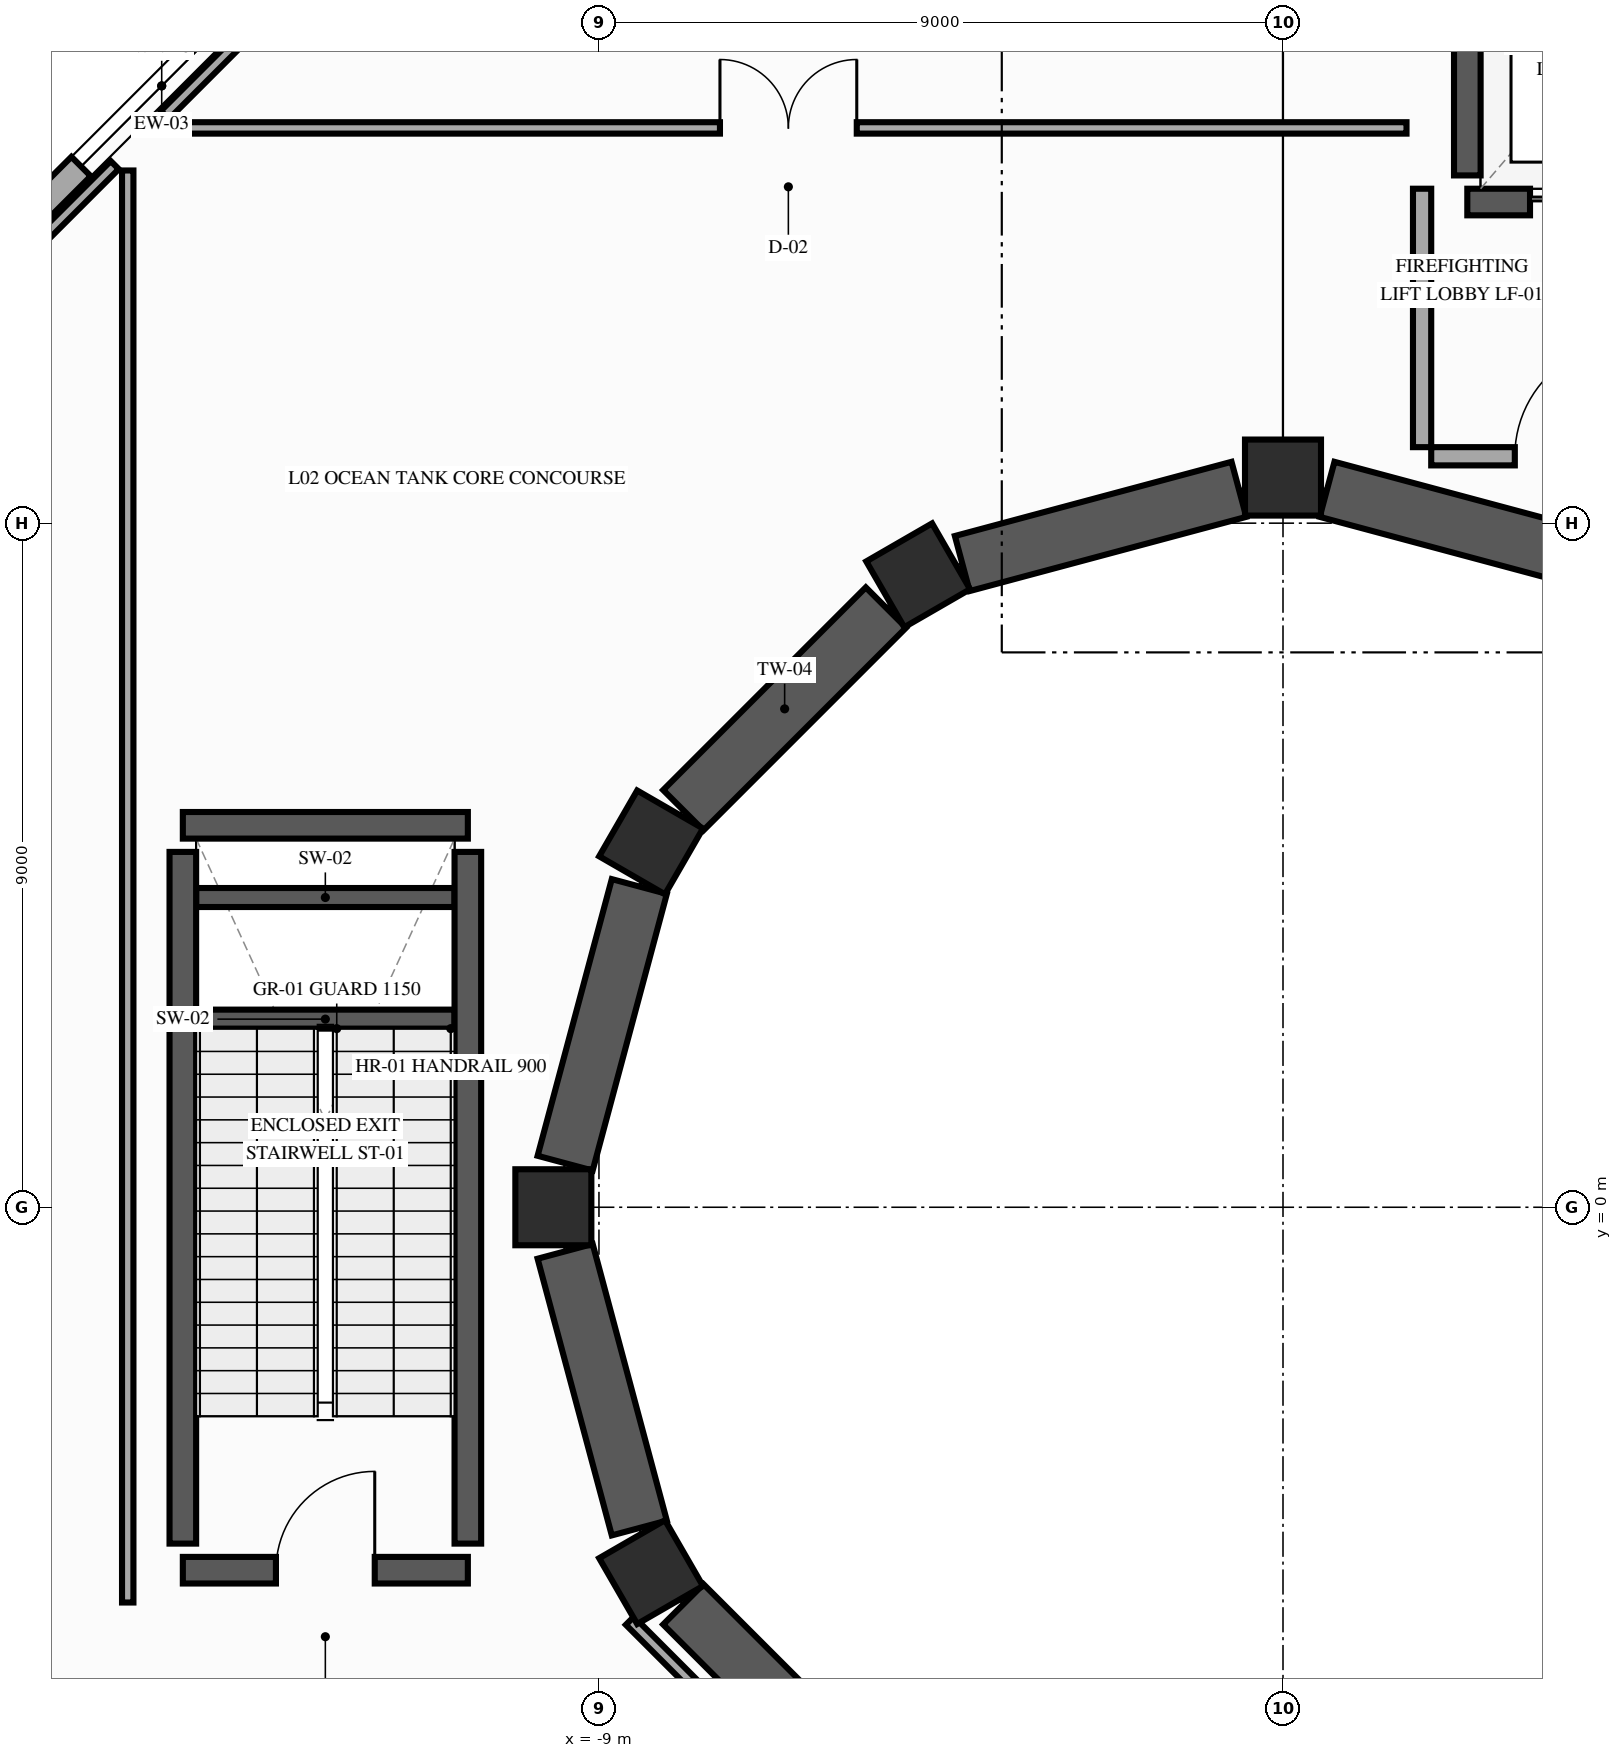
"""IFC4 building model, lengths in metres.
Left out: names, types, materials, properties, quantities, classifications, styles, units other than length and angle.
Written with IfcOpenShell. Run it as: python <this file> out.ifc"""

import sys

from ifc_helpers import new_model, si_unit, direction, frame, frame_2d, origin, origin_2d, place, context, subcontext, project, spatial, rectangle, extrude, element, fill, save


model = new_model("IFC4")
c1 = context("Model", 3, precision=1e-05, world=origin(), true_north=direction((0.0, 1.0)))
c2 = subcontext(c1, "Body", "Model", "MODEL_VIEW")
j1 = project(units=[si_unit("LENGTHUNIT", "METRE"), si_unit("PLANEANGLEUNIT", "RADIAN")], contexts=[c1])
p1 = place(None, origin())
s1 = spatial("IfcSite", under=j1, at=p1, CompositionType="ELEMENT")
p2 = place(p1, origin())
s2 = spatial("IfcBuilding", under=s1, at=p2, CompositionType="ELEMENT")
p3 = place(p2, frame((0.0, 0.0, 10.8)))
s3 = spatial("IfcBuildingStorey", under=s2, at=p3, CompositionType="ELEMENT", Elevation=10.8)
for number, where, z_axis, x_axis in (
    (1, (0.0, 9.6, 0.0), (0.0, 0.0, 1.0), (0.0, 1.0, 0.0)),
    (2, (-4.8, 8.314, 0.0), (0.0, 0.0, 1.0), (-0.5, 0.866, 0.0)),
    (3, (-8.314, 4.8, 0.0), (0.0, 0.0, 1.0), (-0.866, 0.5, 0.0)),
    (4, (-9.6, 0.0, 0.0), (0.0, 0.0, 1.0), (-1.0, 0.0, 0.0)),
    (5, (-8.314, -4.8, 0.0), (0.0, 0.0, 1.0), (-0.866, -0.5, 0.0)),
):
    element("IfcColumn", number, at=place(p3, frame(where, z_axis=z_axis, x_axis=x_axis)), inside=s3, PredefinedType="COLUMN", context=c2, shape_type="SweptSolid", body=[
        extrude(rectangle(XDim=1.0, YDim=1.0, at=origin_2d()), origin(), (0.0, 0.0, 1.0), 5.4),
    ])
for number, where, z_axis, x_axis in (
    (6, (4.22, 8.469, 0.0), (0.0, 0.0, 1.0), (-0.966, 0.259, 0.0)),
    (7, (-0.58, 9.445, 0.0), (0.0, 0.0, 1.0), (-0.966, -0.259, 0.0)),
):
    element("IfcWall", number, at=place(p3, frame(where, z_axis=z_axis, x_axis=x_axis)), inside=s3, PredefinedType="SHEAR", context=c2, shape_type="SweptSolid", body=[
        extrude(rectangle(XDim=3.769, YDim=0.75, at=frame_2d((1.884, 0.0))), origin(), (0.0, 0.0, 1.0), 5.16),
    ])
p4 = place(p3, frame((-5.224, 7.89, 0.0), z_axis=(0.0, 0.0, 1.0), x_axis=(-0.707106781187, -0.707106781187, 0.0)))
e8 = element("IfcWall", 8, at=p4, inside=s3, PredefinedType="SHEAR", context=c2, shape_type="SweptSolid", body=[
    extrude(rectangle(XDim=3.77, YDim=0.75, at=frame_2d((1.885, 0.0))), origin(), (0.0, 0.0, 1.0), 5.16),
])
for number, where, z_axis, x_axis in (
    (9, (-8.469, 4.22, 0.0), (0.0, 0.0, 1.0), (-0.259, -0.966, 0.0)),
    (10, (-9.445, -0.58, 0.0), (0.0, 0.0, 1.0), (0.259, -0.966, 0.0)),
):
    element("IfcWall", number, at=place(p3, frame(where, z_axis=z_axis, x_axis=x_axis)), inside=s3, PredefinedType="SHEAR", context=c2, shape_type="SweptSolid", body=[
        extrude(rectangle(XDim=3.769, YDim=0.75, at=frame_2d((1.884, 0.0))), origin(), (0.0, 0.0, 1.0), 5.16),
    ])
p5 = place(p3, frame((-7.89, -5.224, 0.0), z_axis=(0.0, 0.0, 1.0), x_axis=(0.707106781187, -0.707106781187, 0.0)))
e11 = element("IfcWall", 11, at=p5, inside=s3, PredefinedType="SHEAR", context=c2, shape_type="SweptSolid", body=[
    extrude(rectangle(XDim=3.77, YDim=0.75, at=frame_2d((1.885, 0.0))), origin(), (0.0, 0.0, 1.0), 5.16),
])
p6 = place(p3, frame((-18.215, 11.291, 0.0), z_axis=(0.0, 0.0, 1.0), x_axis=(0.707106781187, 0.707106781187, 0.0)))
e12 = element("IfcWall", 12, at=p6, inside=s3, PredefinedType="SOLIDWALL", context=c2, shape_type="SweptSolid", body=[
    extrude(rectangle(XDim=9.792, YDim=0.36, at=frame_2d((4.896, 0.0))), origin(), (0.0, 0.0, 1.0), 4.395),
])
p7 = place(p6, frame((3.396, 0.0, 0.9)))
e13 = element("IfcOpeningElement", 13, at=p7, cuts=e12, PredefinedType="OPENING", context=c2, shape_type="SweptSolid", body=[
    extrude(rectangle(XDim=3.0, YDim=2.0, at=frame_2d((1.5, 1.0))), frame((0.0, 0.19, 0.0), z_axis=(0.0, -1.0, 0.0), x_axis=(1.0, 0.0, 0.0)), (0.0, 0.0, 1.0), 0.38),
])
for number, where, z_axis, x_axis in (
    (14, (-14.3, 2.475, 0.0), (0.0, 0.0, 1.0), (1.0, 0.0, 0.0)),
    (15, (-14.3, 4.075, 0.0), (0.0, 0.0, 1.0), (1.0, 0.0, 0.0)),
):
    element("IfcWall", number, at=place(p3, frame(where, z_axis=z_axis, x_axis=x_axis)), inside=s3, PredefinedType="SHEAR", context=c2, shape_type="SweptSolid", body=[
        extrude(rectangle(XDim=3.4, YDim=0.25, at=frame_2d((1.7, 0.0))), origin(), (0.0, 0.0, 1.0), 2.5),
    ])
p8 = place(p3, frame((-14.475, -4.775, 0.0), z_axis=(0.0, 0.0, 1.0), x_axis=(1.0, 0.0, 0.0)))
e16 = element("IfcWall", 16, at=p8, inside=s3, PredefinedType="SHEAR", context=c2, shape_type="SweptSolid", body=[
    extrude(rectangle(XDim=3.75, YDim=0.35, at=frame_2d((1.875, 0.0))), origin(), (0.0, 0.0, 1.0), 5.16),
])
p9 = place(p8, frame((1.225, 0.0, 0.0)))
e17 = element("IfcOpeningElement", 17, at=p9, cuts=e16, PredefinedType="OPENING", context=c2, shape_type="SweptSolid", body=[
    extrude(rectangle(XDim=1.3, YDim=2.2, at=frame_2d((0.65, 1.1))), frame((0.0, 0.185, 0.0), z_axis=(0.0, -1.0, 0.0), x_axis=(1.0, 0.0, 0.0)), (0.0, 0.0, 1.0), 0.37),
])
p10 = place(p3, frame((-14.475, 5.025, 0.0), z_axis=(0.0, 0.0, 1.0), x_axis=(1.0, 0.0, 0.0)))
e18 = element("IfcWall", 18, at=p10, inside=s3, PredefinedType="SHEAR", context=c2, shape_type="SweptSolid", body=[
    extrude(rectangle(XDim=3.75, YDim=0.35, at=frame_2d((1.875, 0.0))), origin(), (0.0, 0.0, 1.0), 5.16),
])
for number, where, z_axis, x_axis in (
    (19, (-14.475, -4.425, 0.0), (0.0, 0.0, 1.0), (0.0, 1.0, 0.0)),
    (20, (-10.725, -4.425, 0.0), (0.0, 0.0, 1.0), (0.0, 1.0, 0.0)),
):
    element("IfcWall", number, at=place(p3, frame(where, z_axis=z_axis, x_axis=x_axis)), inside=s3, PredefinedType="SHEAR", context=c2, shape_type="SweptSolid", body=[
        extrude(rectangle(XDim=9.1, YDim=0.35, at=frame_2d((4.55, 0.0))), origin(), (0.0, 0.0, 1.0), 5.16),
    ])
p11 = place(p3, frame((2.425, 13.225, 0.0), z_axis=(0.0, 0.0, 1.0), x_axis=(1.0, 0.0, 0.0)))
e21 = element("IfcWall", 21, at=p11, inside=s3, PredefinedType="SHEAR", context=c2, shape_type="SweptSolid", body=[
    extrude(rectangle(XDim=2.75, YDim=0.35, at=frame_2d((1.375, 0.0))), origin(), (0.0, 0.0, 1.0), 5.16),
])
p12 = place(p11, frame((0.825, 0.0, 0.0)))
e22 = element("IfcOpeningElement", 22, at=p12, cuts=e21, PredefinedType="OPENING", context=c2, shape_type="SweptSolid", body=[
    extrude(rectangle(XDim=1.1, YDim=2.2, at=frame_2d((0.55, 1.1))), frame((0.0, 0.185, 0.0), z_axis=(0.0, -1.0, 0.0), x_axis=(1.0, 0.0, 0.0)), (0.0, 0.0, 1.0), 0.37),
])
p13 = place(p3, frame((2.425, 13.575, 0.0), z_axis=(0.0, 0.0, 1.0), x_axis=(0.0, 1.0, 0.0)))
e23 = element("IfcWall", 23, at=p13, inside=s3, PredefinedType="SHEAR", context=c2, shape_type="SweptSolid", body=[
    extrude(rectangle(XDim=2.45, YDim=0.35, at=frame_2d((1.225, 0.0))), origin(), (0.0, 0.0, 1.0), 5.16),
])
p14 = place(p3, frame((1.95, 9.88, 0.0), z_axis=(0.0, 0.0, 1.0), x_axis=(1.0, 0.0, 0.0)))
e24 = element("IfcWall", 24, at=p14, inside=s3, PredefinedType="PARTITIONING", context=c2, shape_type="SweptSolid", body=[
    extrude(rectangle(XDim=3.7, YDim=0.24, at=frame_2d((1.85, 0.0))), origin(), (0.0, 0.0, 1.0), 4.545),
])
p15 = place(p14, frame((1.1, 0.0, 0.0)))
e25 = element("IfcOpeningElement", 25, at=p15, cuts=e24, PredefinedType="OPENING", context=c2, shape_type="SweptSolid", body=[
    extrude(rectangle(XDim=1.5, YDim=2.2, at=frame_2d((0.75, 1.1))), frame((0.0, 0.13, 0.0), z_axis=(0.0, -1.0, 0.0), x_axis=(1.0, 0.0, 0.0)), (0.0, 0.0, 1.0), 0.26),
])
p16 = place(p3, frame((1.83, 10.0, 0.0), z_axis=(0.0, 0.0, 1.0), x_axis=(0.0, 1.0, 0.0)))
e26 = element("IfcWall", 26, at=p16, inside=s3, PredefinedType="PARTITIONING", context=c2, shape_type="SweptSolid", body=[
    extrude(rectangle(XDim=3.4, YDim=0.24, at=frame_2d((1.7, 0.0))), origin(), (0.0, 0.0, 1.0), 5.11),
])
p17 = place(p3, frame((-5.44, -8.593, 0.0), z_axis=(0.0, 0.0, 1.0), x_axis=(-0.707106781187, 0.707106781187, 0.0)))
e27 = element("IfcWall", 27, at=p17, inside=s3, PredefinedType="PARTITIONING", context=c2, shape_type="SweptSolid", body=[
    extrude(rectangle(XDim=4.459, YDim=0.15, at=frame_2d((2.229, 0.0))), origin(), (0.0, 0.0, 1.0), 4.545),
])
p18 = place(p3, frame((-15.2, -5.2, 0.0), z_axis=(0.0, 0.0, 1.0), x_axis=(0.0, 1.0, 0.0)))
e28 = element("IfcWall", 28, at=p18, inside=s3, PredefinedType="PARTITIONING", context=c2, shape_type="SweptSolid", body=[
    extrude(rectangle(XDim=18.84, YDim=0.15, at=frame_2d((9.42, 0.0))), origin(), (0.0, 0.0, 1.0), 4.395),
])
p19 = place(p3, frame((-15.371, 13.711, 0.0), z_axis=(0.0, 0.0, 1.0), x_axis=(-0.706972707094, -0.707240829862, 0.0)))
e29 = element("IfcWall", 29, at=p19, inside=s3, PredefinedType="PARTITIONING", context=c2, shape_type="SweptSolid", body=[
    extrude(rectangle(XDim=3.642, YDim=0.15, at=frame_2d((1.821, 0.0))), origin(), (0.0, 0.0, 1.0), 4.395),
])
p20 = place(p3, frame((-14.64, 14.2, 0.0), z_axis=(0.0, 0.0, 1.0), x_axis=(1.0, 0.0, 0.0)))
e30 = element("IfcWall", 30, at=p20, inside=s3, PredefinedType="PARTITIONING", context=c2, shape_type="SweptSolid", body=[
    extrude(rectangle(XDim=16.265, YDim=0.15, at=frame_2d((8.132, 0.0))), origin(), (0.0, 0.0, 1.0), 4.395),
])
p21 = place(p20, frame((7.232, 0.0, 0.0)))
e31 = element("IfcOpeningElement", 31, at=p21, cuts=e30, PredefinedType="OPENING", context=c2, shape_type="SweptSolid", body=[
    extrude(rectangle(XDim=1.8, YDim=2.3, at=frame_2d((0.9, 1.15))), frame((0.0, 0.085, 0.0), z_axis=(0.0, -1.0, 0.0), x_axis=(1.0, 0.0, 0.0)), (0.0, 0.0, 1.0), 0.17),
])
p22 = place(p3, frame((-11.136, 17.946, 0.0), z_axis=(0.0, 0.0, 1.0), x_axis=(-0.707106781187, -0.707106781187, 0.0)))
e32 = element("IfcWall", 32, at=p22, inside=s3, PredefinedType="PARTITIONING", context=c2, shape_type="SweptSolid", body=[
    extrude(rectangle(XDim=5.056, YDim=0.15, at=frame_2d((2.528, 0.0))), origin(), (0.0, 0.0, 1.0), 4.395),
])
p23 = place(p7, origin())
e33 = element("IfcWindow", 33, at=p23, inside=s3, PartitioningType="SINGLE_PANEL", PredefinedType="WINDOW", context=c2, shape_type="SweptSolid", body=[
    extrude(rectangle(XDim=3.0, YDim=2.0, at=frame_2d((1.5, 1.0))), frame((0.0, 0.03, 0.0), z_axis=(0.0, -1.0, 0.0), x_axis=(1.0, 0.0, 0.0)), (0.0, 0.0, 1.0), 0.06),
])
fill(e13, e33)
p24 = place(p9, origin())
e34 = element("IfcDoor", 34, at=p24, inside=s3, OperationType="SINGLE_SWING_RIGHT", PredefinedType="DOOR", context=c2, shape_type="SweptSolid", body=[
    extrude(rectangle(XDim=1.3, YDim=2.2, at=frame_2d((0.65, 1.1))), frame((0.0, 0.025, 0.0), z_axis=(0.0, -1.0, 0.0), x_axis=(1.0, 0.0, 0.0)), (0.0, 0.0, 1.0), 0.05),
])
fill(e17, e34)
p25 = place(p12, origin())
e35 = element("IfcDoor", 35, at=p25, inside=s3, OperationType="DOUBLE_DOOR_SLIDING", PredefinedType="DOOR", context=c2, shape_type="SweptSolid", body=[
    extrude(rectangle(XDim=1.1, YDim=2.2, at=frame_2d((0.55, 1.1))), frame((0.0, 0.025, 0.0), z_axis=(0.0, -1.0, 0.0), x_axis=(1.0, 0.0, 0.0)), (0.0, 0.0, 1.0), 0.05),
])
fill(e22, e35)
p26 = place(p15, origin())
e36 = element("IfcDoor", 36, at=p26, inside=s3, OperationType="SINGLE_SWING_RIGHT", PredefinedType="DOOR", context=c2, shape_type="SweptSolid", body=[
    extrude(rectangle(XDim=1.5, YDim=2.2, at=frame_2d((0.75, 1.1))), frame((0.0, 0.025, 0.0), z_axis=(0.0, -1.0, 0.0), x_axis=(1.0, 0.0, 0.0)), (0.0, 0.0, 1.0), 0.05),
])
fill(e25, e36)
p27 = place(p21, origin())
e37 = element("IfcDoor", 37, at=p27, inside=s3, OperationType="DOUBLE_DOOR_SINGLE_SWING", PredefinedType="DOOR", context=c2, shape_type="SweptSolid", body=[
    extrude(rectangle(XDim=1.8, YDim=2.3, at=frame_2d((0.9, 1.15))), frame((0.0, 0.025, 0.0), z_axis=(0.0, -1.0, 0.0), x_axis=(1.0, 0.0, 0.0)), (0.0, 0.0, 1.0), 0.05),
])
fill(e31, e37)
save(model, sys.argv[1])
